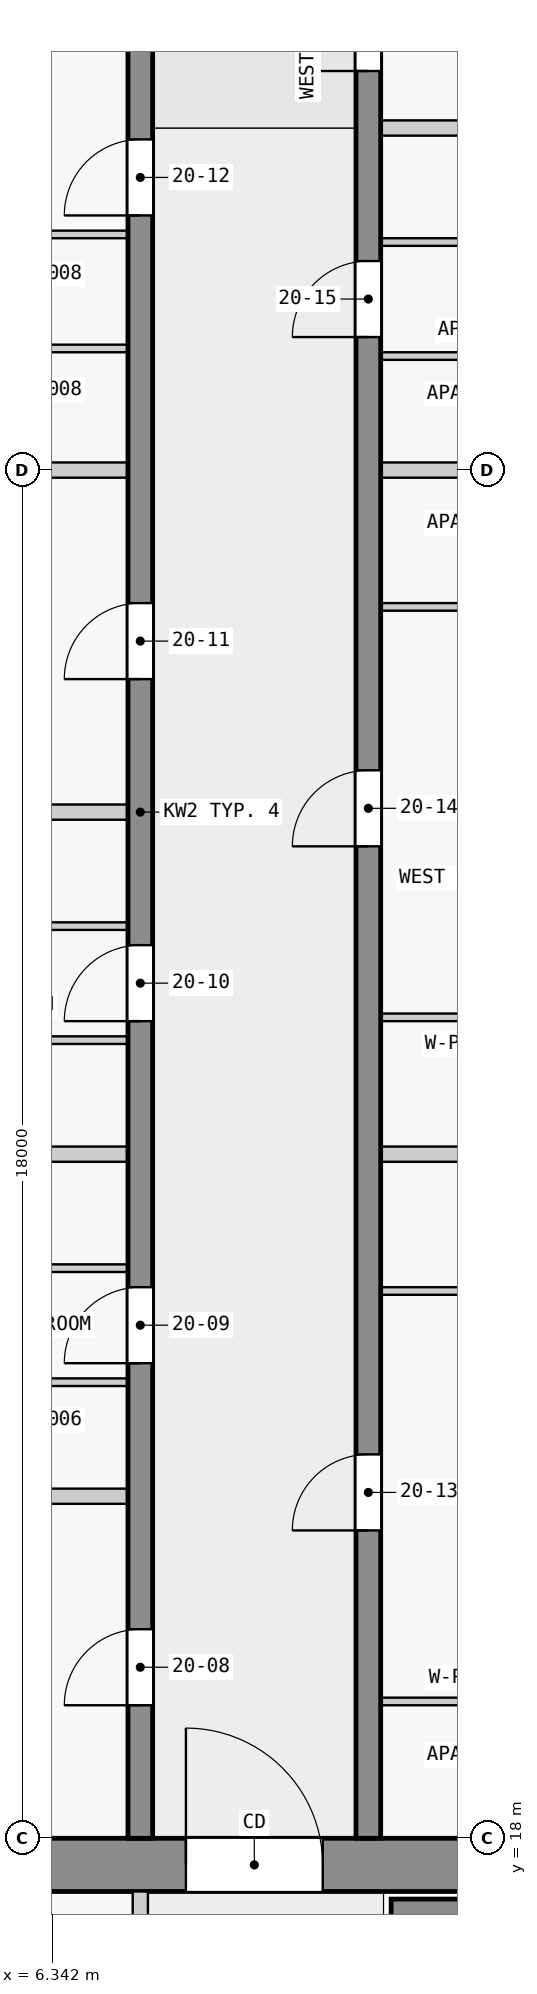
"""IFC4 building model, lengths in metres.
Left out: names, types, materials, properties, quantities, classifications, styles, units other than length and angle.
Written with IfcOpenShell. Run it as: python <this file> out.ifc"""

import sys

from ifc_helpers import new_model, si_unit, direction, frame, frame_2d, origin, place, context, subcontext, project, spatial, rectangle, extrude, element, fill, save


model = new_model("IFC4")
c1 = context("Model", 3, precision=1e-05, world=origin(), true_north=direction((0.0, 1.0)))
c2 = subcontext(c1, "Body", "Model", "MODEL_VIEW")
j1 = project(units=[si_unit("LENGTHUNIT", "METRE"), si_unit("PLANEANGLEUNIT", "RADIAN")], contexts=[c1])
p1 = place(None, origin())
s1 = spatial("IfcSite", under=j1, at=p1, CompositionType="ELEMENT")
p2 = place(p1, origin())
s2 = spatial("IfcBuilding", under=s1, at=p2, CompositionType="ELEMENT")
p3 = place(p2, frame((0.0, 0.0, 81.8)))
s3 = spatial("IfcBuildingStorey", under=s2, at=p3, CompositionType="ELEMENT", Elevation=81.8)
p4 = place(p3, frame((1.6, 17.65, 0.0), z_axis=(0.0, 0.0, 1.0), x_axis=(1.0, 0.0, 0.0)))
e1 = element("IfcWall", 1, at=p4, inside=s3, PredefinedType="SHEAR", context=c2, shape_type="SweptSolid", body=[
    extrude(rectangle(XDim=20.9, YDim=0.7, at=frame_2d((10.45, 0.0))), origin(), (0.0, 0.0, 1.0), 3.25),
])
p5 = place(p4, frame((6.5, 0.0, 0.0)))
e2 = element("IfcOpeningElement", 2, at=p5, cuts=e1, PredefinedType="OPENING", context=c2, shape_type="SweptSolid", body=[
    extrude(rectangle(XDim=1.8, YDim=2.1, at=frame_2d((0.9, 1.05))), frame((0.0, 0.36, 0.0), z_axis=(0.0, -1.0, 0.0), x_axis=(1.0, 0.0, 0.0)), (0.0, 0.0, 1.0), 0.72),
])
p6 = place(p3, frame((10.8, 17.05, 0.0), z_axis=(0.0, 0.0, 1.0), x_axis=(1.0, 0.0, 0.0)))
e3 = element("IfcWall", 3, at=p6, inside=s3, PredefinedType="SHEAR", context=c2, shape_type="SweptSolid", body=[
    extrude(rectangle(XDim=7.8, YDim=0.3, at=frame_2d((3.9, 0.0))), origin(), (0.0, 0.0, 1.0), 3.25),
])
p7 = place(p3, frame((7.5, 18.0, 0.0), z_axis=(0.0, 0.0, 1.0), x_axis=(0.0, 1.0, 0.0)))
e4 = element("IfcWall", 4, at=p7, inside=s3, PredefinedType="SHEAR", context=c2, shape_type="SweptSolid", body=[
    extrude(rectangle(XDim=27.0, YDim=0.325, at=frame_2d((13.5, 0.0))), origin(), (0.0, 0.0, 1.0), 3.25),
])
p8 = place(p7, frame((1.75, 0.0, 0.0)))
e5 = element("IfcOpeningElement", 5, at=p8, cuts=e4, PredefinedType="OPENING", context=c2, shape_type="SweptSolid", body=[
    extrude(rectangle(XDim=1.0, YDim=2.1, at=frame_2d((0.5, 1.05))), frame((0.0, 0.172, 0.0), z_axis=(0.0, -1.0, 0.0), x_axis=(1.0, 0.0, 0.0)), (0.0, 0.0, 1.0), 0.345),
])
p9 = place(p7, frame((6.25, 0.0, 0.0)))
e6 = element("IfcOpeningElement", 6, at=p9, cuts=e4, PredefinedType="OPENING", context=c2, shape_type="SweptSolid", body=[
    extrude(rectangle(XDim=1.0, YDim=2.1, at=frame_2d((0.5, 1.05))), frame((0.0, 0.172, 0.0), z_axis=(0.0, -1.0, 0.0), x_axis=(1.0, 0.0, 0.0)), (0.0, 0.0, 1.0), 0.345),
])
p10 = place(p7, frame((10.75, 0.0, 0.0)))
e7 = element("IfcOpeningElement", 7, at=p10, cuts=e4, PredefinedType="OPENING", context=c2, shape_type="SweptSolid", body=[
    extrude(rectangle(XDim=1.0, YDim=2.1, at=frame_2d((0.5, 1.05))), frame((0.0, 0.172, 0.0), z_axis=(0.0, -1.0, 0.0), x_axis=(1.0, 0.0, 0.0)), (0.0, 0.0, 1.0), 0.345),
])
p11 = place(p7, frame((15.25, 0.0, 0.0)))
e8 = element("IfcOpeningElement", 8, at=p11, cuts=e4, PredefinedType="OPENING", context=c2, shape_type="SweptSolid", body=[
    extrude(rectangle(XDim=1.0, YDim=2.1, at=frame_2d((0.5, 1.05))), frame((0.0, 0.172, 0.0), z_axis=(0.0, -1.0, 0.0), x_axis=(1.0, 0.0, 0.0)), (0.0, 0.0, 1.0), 0.345),
])
p12 = place(p7, frame((21.35, 0.0, 0.0)))
e9 = element("IfcOpeningElement", 9, at=p12, cuts=e4, PredefinedType="OPENING", context=c2, shape_type="SweptSolid", body=[
    extrude(rectangle(XDim=1.0, YDim=2.1, at=frame_2d((0.5, 1.05))), frame((0.0, 0.172, 0.0), z_axis=(0.0, -1.0, 0.0), x_axis=(1.0, 0.0, 0.0)), (0.0, 0.0, 1.0), 0.345),
])
p13 = place(p3, frame((10.5, 18.0, 0.0), z_axis=(0.0, 0.0, 1.0), x_axis=(0.0, 1.0, 0.0)))
e10 = element("IfcWall", 10, at=p13, inside=s3, PredefinedType="SHEAR", context=c2, shape_type="SweptSolid", body=[
    extrude(rectangle(XDim=27.0, YDim=0.325, at=frame_2d((13.5, 0.0))), origin(), (0.0, 0.0, 1.0), 3.25),
])
p14 = place(p13, frame((4.05, 0.0, 0.0)))
e11 = element("IfcOpeningElement", 11, at=p14, cuts=e10, PredefinedType="OPENING", context=c2, shape_type="SweptSolid", body=[
    extrude(rectangle(XDim=1.0, YDim=2.1, at=frame_2d((0.5, 1.05))), frame((0.0, 0.172, 0.0), z_axis=(0.0, -1.0, 0.0), x_axis=(1.0, 0.0, 0.0)), (0.0, 0.0, 1.0), 0.345),
])
p15 = place(p13, frame((13.05, 0.0, 0.0)))
e12 = element("IfcOpeningElement", 12, at=p15, cuts=e10, PredefinedType="OPENING", context=c2, shape_type="SweptSolid", body=[
    extrude(rectangle(XDim=1.0, YDim=2.1, at=frame_2d((0.5, 1.05))), frame((0.0, 0.172, 0.0), z_axis=(0.0, -1.0, 0.0), x_axis=(1.0, 0.0, 0.0)), (0.0, 0.0, 1.0), 0.345),
])
p16 = place(p13, frame((19.75, 0.0, 0.0)))
e13 = element("IfcOpeningElement", 13, at=p16, cuts=e10, PredefinedType="OPENING", context=c2, shape_type="SweptSolid", body=[
    extrude(rectangle(XDim=1.0, YDim=2.1, at=frame_2d((0.5, 1.05))), frame((0.0, 0.172, 0.0), z_axis=(0.0, -1.0, 0.0), x_axis=(1.0, 0.0, 0.0)), (0.0, 0.0, 1.0), 0.345),
])
p17 = place(p13, frame((23.25, 0.0, 0.0)))
e14 = element("IfcOpeningElement", 14, at=p17, cuts=e10, PredefinedType="OPENING", context=c2, shape_type="SweptSolid", body=[
    extrude(rectangle(XDim=0.9, YDim=2.1, at=frame_2d((0.45, 1.05))), frame((0.0, 0.172, 0.0), z_axis=(0.0, -1.0, 0.0), x_axis=(1.0, 0.0, 0.0)), (0.0, 0.0, 1.0), 0.345),
])
p18 = place(p13, frame((25.45, 0.0, 0.0)))
e15 = element("IfcOpeningElement", 15, at=p18, cuts=e10, PredefinedType="OPENING", context=c2, shape_type="SweptSolid", body=[
    extrude(rectangle(XDim=1.0, YDim=2.1, at=frame_2d((0.5, 1.05))), frame((0.0, 0.172, 0.0), z_axis=(0.0, -1.0, 0.0), x_axis=(1.0, 0.0, 0.0)), (0.0, 0.0, 1.0), 0.345),
])
p19 = place(p3, frame((7.5, 10.1, 0.0), z_axis=(0.0, 0.0, 1.0), x_axis=(0.0, 1.0, 0.0)))
e16 = element("IfcWall", 16, at=p19, inside=s3, PredefinedType="PARTITIONING", context=c2, shape_type="SweptSolid", body=[
    extrude(rectangle(XDim=7.2, YDim=0.2, at=frame_2d((3.6, 0.0))), origin(), (0.0, 0.0, 1.0), 3.25),
])
p20 = place(p19, frame((0.75, 0.0, 0.0)))
e17 = element("IfcOpeningElement", 17, at=p20, cuts=e16, PredefinedType="OPENING", context=c2, shape_type="SweptSolid", body=[
    extrude(rectangle(XDim=0.9, YDim=2.1, at=frame_2d((0.45, 1.05))), frame((0.0, 0.11, 0.0), z_axis=(0.0, -1.0, 0.0), x_axis=(1.0, 0.0, 0.0)), (0.0, 0.0, 1.0), 0.22),
])
p21 = place(p19, frame((3.175, 0.0, 0.0)))
e18 = element("IfcOpeningElement", 18, at=p21, cuts=e16, PredefinedType="OPENING", context=c2, shape_type="SweptSolid", body=[
    extrude(rectangle(XDim=0.9, YDim=2.1, at=frame_2d((0.45, 1.05))), frame((0.0, 0.11, 0.0), z_axis=(0.0, -1.0, 0.0), x_axis=(1.0, 0.0, 0.0)), (0.0, 0.0, 1.0), 0.22),
])
p22 = place(p19, frame((5.25, 0.0, 0.0)))
e19 = element("IfcOpeningElement", 19, at=p22, cuts=e16, PredefinedType="OPENING", context=c2, shape_type="SweptSolid", body=[
    extrude(rectangle(XDim=0.9, YDim=2.1, at=frame_2d((0.45, 1.05))), frame((0.0, 0.11, 0.0), z_axis=(0.0, -1.0, 0.0), x_axis=(1.0, 0.0, 0.0)), (0.0, 0.0, 1.0), 0.22),
])
p23 = place(p3, frame((14.062, 19.8, 0.0), z_axis=(0.0, 0.0, 1.0), x_axis=(-1.0, 0.0, 0.0)))
e20 = element("IfcWall", 20, at=p23, inside=s3, PredefinedType="PARTITIONING", context=c2, shape_type="SweptSolid", body=[
    extrude(rectangle(XDim=3.4, YDim=0.1, at=frame_2d((1.7, 0.0))), origin(), (0.0, 0.0, 1.0), 3.25),
])
p24 = place(p23, frame((1.25, 0.0, 0.0)))
e21 = element("IfcOpeningElement", 21, at=p24, cuts=e20, PredefinedType="OPENING", context=c2, shape_type="SweptSolid", body=[
    extrude(rectangle(XDim=0.9, YDim=2.1, at=frame_2d((0.45, 1.05))), frame((0.0, 0.06, 0.0), z_axis=(0.0, -1.0, 0.0), x_axis=(1.0, 0.0, 0.0)), (0.0, 0.0, 1.0), 0.12),
])
p25 = place(p3, frame((7.337, 22.5, 0.0), z_axis=(0.0, 0.0, 1.0), x_axis=(-1.0, 0.0, 0.0)))
e22 = element("IfcWall", 22, at=p25, inside=s3, PredefinedType="PARTITIONING", context=c2, shape_type="SweptSolid", body=[
    extrude(rectangle(XDim=7.188, YDim=0.2, at=frame_2d((3.594, 0.0))), origin(), (0.0, 0.0, 1.0), 3.25),
])
p26 = place(p3, frame((7.337, 24.0, 0.0), z_axis=(0.0, 0.0, 1.0), x_axis=(-1.0, 0.0, 0.0)))
e23 = element("IfcWall", 23, at=p26, inside=s3, PredefinedType="PARTITIONING", context=c2, shape_type="SweptSolid", body=[
    extrude(rectangle(XDim=3.4, YDim=0.1, at=frame_2d((1.7, 0.0))), origin(), (0.0, 0.0, 1.0), 3.25),
])
p27 = place(p26, frame((1.25, 0.0, 0.0)))
e24 = element("IfcOpeningElement", 24, at=p27, cuts=e23, PredefinedType="OPENING", context=c2, shape_type="SweptSolid", body=[
    extrude(rectangle(XDim=0.9, YDim=2.1, at=frame_2d((0.45, 1.05))), frame((0.0, 0.06, 0.0), z_axis=(0.0, -1.0, 0.0), x_axis=(1.0, 0.0, 0.0)), (0.0, 0.0, 1.0), 0.12),
])
p28 = place(p3, frame((10.663, 25.2, 0.0), z_axis=(0.0, 0.0, 1.0), x_axis=(1.0, 0.0, 0.0)))
e25 = element("IfcWall", 25, at=p28, inside=s3, PredefinedType="PARTITIONING", context=c2, shape_type="SweptSolid", body=[
    extrude(rectangle(XDim=3.35, YDim=0.1, at=frame_2d((1.675, 0.0))), origin(), (0.0, 0.0, 1.0), 3.25),
])
p29 = place(p28, frame((1.25, 0.0, 0.0)))
e26 = element("IfcOpeningElement", 26, at=p29, cuts=e25, PredefinedType="OPENING", context=c2, shape_type="SweptSolid", body=[
    extrude(rectangle(XDim=0.9, YDim=2.1, at=frame_2d((0.45, 1.05))), frame((0.0, 0.06, 0.0), z_axis=(0.0, -1.0, 0.0), x_axis=(1.0, 0.0, 0.0)), (0.0, 0.0, 1.0), 0.12),
])
p30 = place(p3, frame((3.938, 25.5, 0.0), z_axis=(0.0, 0.0, 1.0), x_axis=(1.0, 0.0, 0.0)))
e27 = element("IfcWall", 27, at=p30, inside=s3, PredefinedType="PARTITIONING", context=c2, shape_type="SweptSolid", body=[
    extrude(rectangle(XDim=3.4, YDim=0.1, at=frame_2d((1.7, 0.0))), origin(), (0.0, 0.0, 1.0), 3.25),
])
p31 = place(p30, frame((1.25, 0.0, 0.0)))
e28 = element("IfcOpeningElement", 28, at=p31, cuts=e27, PredefinedType="OPENING", context=c2, shape_type="SweptSolid", body=[
    extrude(rectangle(XDim=0.9, YDim=2.1, at=frame_2d((0.45, 1.05))), frame((0.0, 0.06, 0.0), z_axis=(0.0, -1.0, 0.0), x_axis=(1.0, 0.0, 0.0)), (0.0, 0.0, 1.0), 0.12),
])
for number, where, z_axis, x_axis in (
    (29, (7.337, 27.0, 0.0), (0.0, 0.0, 1.0), (-1.0, 0.0, 0.0)),
    (30, (13.962, 27.0, 0.0), (0.0, 0.0, 1.0), (-1.0, 0.0, 0.0)),
):
    element("IfcWall", number, at=place(p3, frame(where, z_axis=z_axis, x_axis=x_axis)), inside=s3, PredefinedType="PARTITIONING", context=c2, shape_type="SweptSolid", body=[
        extrude(rectangle(XDim=3.3, YDim=0.2, at=frame_2d((1.65, 0.0))), origin(), (0.0, 0.0, 1.0), 3.25),
    ])
p32 = place(p3, frame((7.337, 28.5, 0.0), z_axis=(0.0, 0.0, 1.0), x_axis=(-1.0, 0.0, 0.0)))
e31 = element("IfcWall", 31, at=p32, inside=s3, PredefinedType="PARTITIONING", context=c2, shape_type="SweptSolid", body=[
    extrude(rectangle(XDim=3.4, YDim=0.1, at=frame_2d((1.7, 0.0))), origin(), (0.0, 0.0, 1.0), 3.25),
])
p33 = place(p32, frame((1.25, 0.0, 0.0)))
e32 = element("IfcOpeningElement", 32, at=p33, cuts=e31, PredefinedType="OPENING", context=c2, shape_type="SweptSolid", body=[
    extrude(rectangle(XDim=0.9, YDim=2.1, at=frame_2d((0.45, 1.05))), frame((0.0, 0.06, 0.0), z_axis=(0.0, -1.0, 0.0), x_axis=(1.0, 0.0, 0.0)), (0.0, 0.0, 1.0), 0.12),
])
p34 = place(p3, frame((14.012, 28.8, 0.0), z_axis=(0.0, 0.0, 1.0), x_axis=(-1.0, 0.0, 0.0)))
e33 = element("IfcWall", 33, at=p34, inside=s3, PredefinedType="PARTITIONING", context=c2, shape_type="SweptSolid", body=[
    extrude(rectangle(XDim=3.35, YDim=0.1, at=frame_2d((1.675, 0.0))), origin(), (0.0, 0.0, 1.0), 3.25),
])
p35 = place(p34, frame((1.25, 0.0, 0.0)))
e34 = element("IfcOpeningElement", 34, at=p35, cuts=e33, PredefinedType="OPENING", context=c2, shape_type="SweptSolid", body=[
    extrude(rectangle(XDim=0.9, YDim=2.1, at=frame_2d((0.45, 1.05))), frame((0.0, 0.06, 0.0), z_axis=(0.0, -1.0, 0.0), x_axis=(1.0, 0.0, 0.0)), (0.0, 0.0, 1.0), 0.12),
])
p36 = place(p3, frame((3.938, 30.0, 0.0), z_axis=(0.0, 0.0, 1.0), x_axis=(1.0, 0.0, 0.0)))
e35 = element("IfcWall", 35, at=p36, inside=s3, PredefinedType="PARTITIONING", context=c2, shape_type="SweptSolid", body=[
    extrude(rectangle(XDim=3.4, YDim=0.1, at=frame_2d((1.7, 0.0))), origin(), (0.0, 0.0, 1.0), 3.25),
])
p37 = place(p36, frame((1.25, 0.0, 0.0)))
e36 = element("IfcOpeningElement", 36, at=p37, cuts=e35, PredefinedType="OPENING", context=c2, shape_type="SweptSolid", body=[
    extrude(rectangle(XDim=0.9, YDim=2.1, at=frame_2d((0.45, 1.05))), frame((0.0, 0.06, 0.0), z_axis=(0.0, -1.0, 0.0), x_axis=(1.0, 0.0, 0.0)), (0.0, 0.0, 1.0), 0.12),
])
p38 = place(p3, frame((7.337, 31.5, 0.0), z_axis=(0.0, 0.0, 1.0), x_axis=(-1.0, 0.0, 0.0)))
e37 = element("IfcWall", 37, at=p38, inside=s3, PredefinedType="PARTITIONING", context=c2, shape_type="SweptSolid", body=[
    extrude(rectangle(XDim=3.3, YDim=0.2, at=frame_2d((1.65, 0.0))), origin(), (0.0, 0.0, 1.0), 3.25),
])
p39 = place(p3, frame((10.663, 34.2, 0.0), z_axis=(0.0, 0.0, 1.0), x_axis=(1.0, 0.0, 0.0)))
e38 = element("IfcWall", 38, at=p39, inside=s3, PredefinedType="PARTITIONING", context=c2, shape_type="SweptSolid", body=[
    extrude(rectangle(XDim=3.4, YDim=0.1, at=frame_2d((1.7, 0.0))), origin(), (0.0, 0.0, 1.0), 3.25),
])
p40 = place(p39, frame((1.25, 0.0, 0.0)))
e39 = element("IfcOpeningElement", 39, at=p40, cuts=e38, PredefinedType="OPENING", context=c2, shape_type="SweptSolid", body=[
    extrude(rectangle(XDim=0.9, YDim=2.1, at=frame_2d((0.45, 1.05))), frame((0.0, 0.06, 0.0), z_axis=(0.0, -1.0, 0.0), x_axis=(1.0, 0.0, 0.0)), (0.0, 0.0, 1.0), 0.12),
])
p41 = place(p3, frame((7.337, 36.0, 0.0), z_axis=(0.0, 0.0, 1.0), x_axis=(-1.0, 0.0, 0.0)))
e40 = element("IfcWall", 40, at=p41, inside=s3, PredefinedType="PARTITIONING", context=c2, shape_type="SweptSolid", body=[
    extrude(rectangle(XDim=5.938, YDim=0.2, at=frame_2d((2.969, 0.0))), origin(), (0.0, 0.0, 1.0), 3.25),
])
p42 = place(p3, frame((14.062, 36.0, 0.0), z_axis=(0.0, 0.0, 1.0), x_axis=(-1.0, 0.0, 0.0)))
e41 = element("IfcWall", 41, at=p42, inside=s3, PredefinedType="PARTITIONING", context=c2, shape_type="SweptSolid", body=[
    extrude(rectangle(XDim=3.4, YDim=0.2, at=frame_2d((1.7, 0.0))), origin(), (0.0, 0.0, 1.0), 3.25),
])
p43 = place(p3, frame((14.062, 37.5, 0.0), z_axis=(0.0, 0.0, 1.0), x_axis=(-1.0, 0.0, 0.0)))
e42 = element("IfcWall", 42, at=p43, inside=s3, PredefinedType="PARTITIONING", context=c2, shape_type="SweptSolid", body=[
    extrude(rectangle(XDim=3.4, YDim=0.1, at=frame_2d((1.7, 0.0))), origin(), (0.0, 0.0, 1.0), 3.25),
])
p44 = place(p43, frame((1.25, 0.0, 0.0)))
e43 = element("IfcOpeningElement", 43, at=p44, cuts=e42, PredefinedType="OPENING", context=c2, shape_type="SweptSolid", body=[
    extrude(rectangle(XDim=0.9, YDim=2.1, at=frame_2d((0.45, 1.05))), frame((0.0, 0.06, 0.0), z_axis=(0.0, -1.0, 0.0), x_axis=(1.0, 0.0, 0.0)), (0.0, 0.0, 1.0), 0.12),
])
p45 = place(p3, frame((7.337, 37.6, 0.0), z_axis=(0.0, 0.0, 1.0), x_axis=(-1.0, 0.0, 0.0)))
e44 = element("IfcWall", 44, at=p45, inside=s3, PredefinedType="PARTITIONING", context=c2, shape_type="SweptSolid", body=[
    extrude(rectangle(XDim=3.4, YDim=0.1, at=frame_2d((1.7, 0.0))), origin(), (0.0, 0.0, 1.0), 3.25),
])
p46 = place(p3, frame((10.663, 39.0, 0.0), z_axis=(0.0, 0.0, 1.0), x_axis=(1.0, 0.0, 0.0)))
e45 = element("IfcWall", 45, at=p46, inside=s3, PredefinedType="PARTITIONING", context=c2, shape_type="SweptSolid", body=[
    extrude(rectangle(XDim=3.4, YDim=0.1, at=frame_2d((1.7, 0.0))), origin(), (0.0, 0.0, 1.0), 3.25),
])
p47 = place(p46, frame((1.25, 0.0, 0.0)))
e46 = element("IfcOpeningElement", 46, at=p47, cuts=e45, PredefinedType="OPENING", context=c2, shape_type="SweptSolid", body=[
    extrude(rectangle(XDim=0.9, YDim=2.1, at=frame_2d((0.45, 1.05))), frame((0.0, 0.06, 0.0), z_axis=(0.0, -1.0, 0.0), x_axis=(1.0, 0.0, 0.0)), (0.0, 0.0, 1.0), 0.12),
])
p48 = place(p3, frame((7.337, 39.1, 0.0), z_axis=(0.0, 0.0, 1.0), x_axis=(-1.0, 0.0, 0.0)))
e47 = element("IfcWall", 47, at=p48, inside=s3, PredefinedType="PARTITIONING", context=c2, shape_type="SweptSolid", body=[
    extrude(rectangle(XDim=3.4, YDim=0.1, at=frame_2d((1.7, 0.0))), origin(), (0.0, 0.0, 1.0), 3.25),
])
p49 = place(p48, frame((1.25, 0.0, 0.0)))
e48 = element("IfcOpeningElement", 48, at=p49, cuts=e47, PredefinedType="OPENING", context=c2, shape_type="SweptSolid", body=[
    extrude(rectangle(XDim=0.9, YDim=2.1, at=frame_2d((0.45, 1.05))), frame((0.0, 0.06, 0.0), z_axis=(0.0, -1.0, 0.0), x_axis=(1.0, 0.0, 0.0)), (0.0, 0.0, 1.0), 0.12),
])
p50 = place(p3, frame((13.962, 40.5, 0.0), z_axis=(0.0, 0.0, 1.0), x_axis=(-1.0, 0.0, 0.0)))
e49 = element("IfcWall", 49, at=p50, inside=s3, PredefinedType="PARTITIONING", context=c2, shape_type="SweptSolid", body=[
    extrude(rectangle(XDim=3.3, YDim=0.2, at=frame_2d((1.65, 0.0))), origin(), (0.0, 0.0, 1.0), 3.25),
])
p51 = place(p5, origin())
e50 = element("IfcDoor", 50, at=p51, inside=s3, OperationType="DOUBLE_DOOR_SINGLE_SWING", PredefinedType="DOOR", context=c2, shape_type="SweptSolid", body=[
    extrude(rectangle(XDim=1.8, YDim=2.1, at=frame_2d((0.9, 1.05))), frame((0.0, 0.025, 0.0), z_axis=(0.0, -1.0, 0.0), x_axis=(1.0, 0.0, 0.0)), (0.0, 0.0, 1.0), 0.05),
])
fill(e2, e50)
p52 = place(p8, origin())
e51 = element("IfcDoor", 51, at=p52, inside=s3, OperationType="SINGLE_SWING_LEFT", PredefinedType="DOOR", context=c2, shape_type="SweptSolid", body=[
    extrude(rectangle(XDim=1.0, YDim=2.1, at=frame_2d((0.5, 1.05))), frame((0.0, 0.025, 0.0), z_axis=(0.0, -1.0, 0.0), x_axis=(1.0, 0.0, 0.0)), (0.0, 0.0, 1.0), 0.05),
])
fill(e5, e51)
p53 = place(p9, origin())
e52 = element("IfcDoor", 52, at=p53, inside=s3, OperationType="SINGLE_SWING_LEFT", PredefinedType="DOOR", context=c2, shape_type="SweptSolid", body=[
    extrude(rectangle(XDim=1.0, YDim=2.1, at=frame_2d((0.5, 1.05))), frame((0.0, 0.025, 0.0), z_axis=(0.0, -1.0, 0.0), x_axis=(1.0, 0.0, 0.0)), (0.0, 0.0, 1.0), 0.05),
])
fill(e6, e52)
p54 = place(p10, origin())
e53 = element("IfcDoor", 53, at=p54, inside=s3, OperationType="SINGLE_SWING_LEFT", PredefinedType="DOOR", context=c2, shape_type="SweptSolid", body=[
    extrude(rectangle(XDim=1.0, YDim=2.1, at=frame_2d((0.5, 1.05))), frame((0.0, 0.025, 0.0), z_axis=(0.0, -1.0, 0.0), x_axis=(1.0, 0.0, 0.0)), (0.0, 0.0, 1.0), 0.05),
])
fill(e7, e53)
p55 = place(p11, origin())
e54 = element("IfcDoor", 54, at=p55, inside=s3, OperationType="SINGLE_SWING_RIGHT", PredefinedType="DOOR", context=c2, shape_type="SweptSolid", body=[
    extrude(rectangle(XDim=1.0, YDim=2.1, at=frame_2d((0.5, 1.05))), frame((0.0, 0.025, 0.0), z_axis=(0.0, -1.0, 0.0), x_axis=(1.0, 0.0, 0.0)), (0.0, 0.0, 1.0), 0.05),
])
fill(e8, e54)
p56 = place(p12, origin())
e55 = element("IfcDoor", 55, at=p56, inside=s3, OperationType="SINGLE_SWING_RIGHT", PredefinedType="DOOR", context=c2, shape_type="SweptSolid", body=[
    extrude(rectangle(XDim=1.0, YDim=2.1, at=frame_2d((0.5, 1.05))), frame((0.0, 0.025, 0.0), z_axis=(0.0, -1.0, 0.0), x_axis=(1.0, 0.0, 0.0)), (0.0, 0.0, 1.0), 0.05),
])
fill(e9, e55)
p57 = place(p14, origin())
e56 = element("IfcDoor", 56, at=p57, inside=s3, OperationType="SINGLE_SWING_LEFT", PredefinedType="DOOR", context=c2, shape_type="SweptSolid", body=[
    extrude(rectangle(XDim=1.0, YDim=2.1, at=frame_2d((0.5, 1.05))), frame((0.0, 0.025, 0.0), z_axis=(0.0, -1.0, 0.0), x_axis=(1.0, 0.0, 0.0)), (0.0, 0.0, 1.0), 0.05),
])
fill(e11, e56)
p58 = place(p15, origin())
e57 = element("IfcDoor", 57, at=p58, inside=s3, OperationType="SINGLE_SWING_RIGHT", PredefinedType="DOOR", context=c2, shape_type="SweptSolid", body=[
    extrude(rectangle(XDim=1.0, YDim=2.1, at=frame_2d((0.5, 1.05))), frame((0.0, 0.025, 0.0), z_axis=(0.0, -1.0, 0.0), x_axis=(1.0, 0.0, 0.0)), (0.0, 0.0, 1.0), 0.05),
])
fill(e12, e57)
p59 = place(p16, origin())
e58 = element("IfcDoor", 58, at=p59, inside=s3, OperationType="SINGLE_SWING_RIGHT", PredefinedType="DOOR", context=c2, shape_type="SweptSolid", body=[
    extrude(rectangle(XDim=1.0, YDim=2.1, at=frame_2d((0.5, 1.05))), frame((0.0, 0.025, 0.0), z_axis=(0.0, -1.0, 0.0), x_axis=(1.0, 0.0, 0.0)), (0.0, 0.0, 1.0), 0.05),
])
fill(e13, e58)
p60 = place(p17, origin())
e59 = element("IfcDoor", 59, at=p60, inside=s3, OperationType="SINGLE_SWING_RIGHT", PredefinedType="DOOR", context=c2, shape_type="SweptSolid", body=[
    extrude(rectangle(XDim=0.9, YDim=2.1, at=frame_2d((0.45, 1.05))), frame((0.0, 0.025, 0.0), z_axis=(0.0, -1.0, 0.0), x_axis=(1.0, 0.0, 0.0)), (0.0, 0.0, 1.0), 0.05),
])
fill(e14, e59)
save(model, sys.argv[1])
